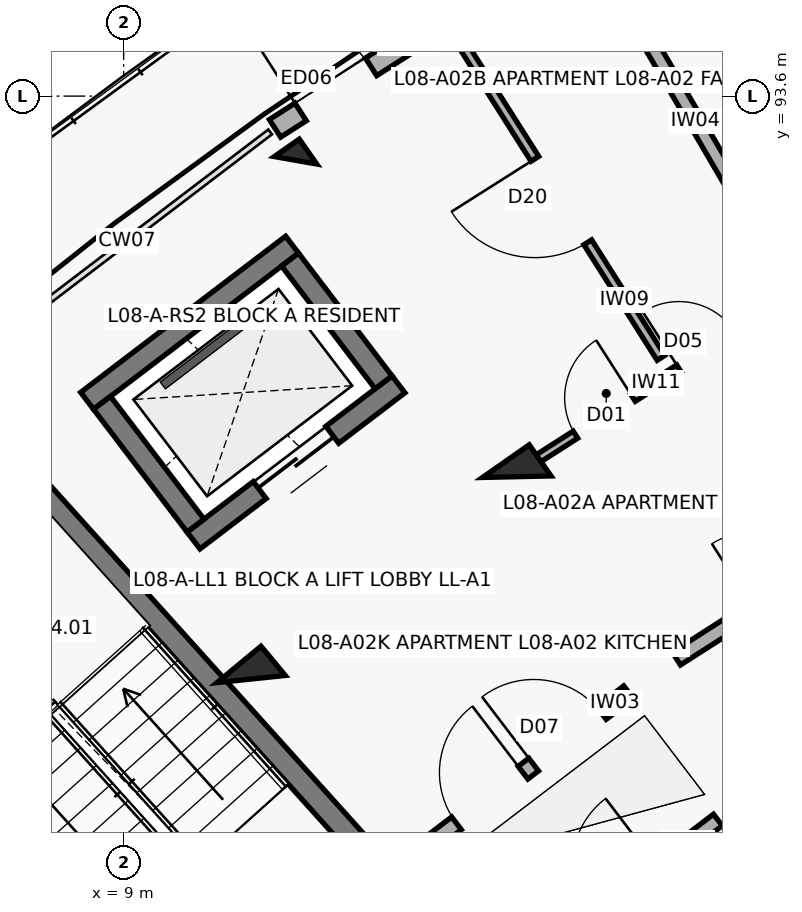
"""IFC4 building model, lengths in metres.
Left out: names, types, materials, properties, quantities, classifications, styles, units other than length and angle.
Written with IfcOpenShell. Run it as: python <this file> out.ifc"""

import sys

from ifc_helpers import new_model, si_unit, direction, frame, frame_2d, origin, origin_2d, place, context, subcontext, project, spatial, rectangle, extrude, element, fill, save


model = new_model("IFC4")
c1 = context("Model", 3, precision=1e-05, world=origin(), true_north=direction((0.0, 1.0)))
c2 = subcontext(c1, "Body", "Model", "MODEL_VIEW")
j1 = project(units=[si_unit("LENGTHUNIT", "METRE"), si_unit("PLANEANGLEUNIT", "RADIAN")], contexts=[c1])
p1 = place(None, origin())
s1 = spatial("IfcSite", under=j1, at=p1, CompositionType="ELEMENT")
p2 = place(p1, origin())
s2 = spatial("IfcBuilding", under=s1, at=p2, CompositionType="ELEMENT")
p3 = place(p2, frame((0.0, 0.0, 26.7)))
s3 = spatial("IfcBuildingStorey", under=s2, at=p3, CompositionType="ELEMENT", Elevation=26.7)
for number, where, z_axis, x_axis in (
    (1, (10.678, 85.93, 0.0), (0.0, 0.0, 1.0), (-0.638, 0.77, 0.0)),
    (2, (14.172, 88.592, 0.0), (0.0, 0.0, 1.0), (-0.573, 0.82, 0.0)),
):
    element("IfcColumn", number, at=place(p3, frame(where, z_axis=z_axis, x_axis=x_axis)), inside=s3, PredefinedType="COLUMN", context=c2, shape_type="SweptSolid", body=[
        extrude(rectangle(XDim=0.5, YDim=0.75, at=origin_2d()), origin(), (0.0, 0.0, 1.0), 3.1),
    ])
p4 = place(p3, frame((11.261, 92.755, 0.0), z_axis=(0.0, 0.0, 1.0), x_axis=(-0.573004420611, 0.819552276527, 0.0)))
e3 = element("IfcColumn", 3, at=p4, inside=s3, PredefinedType="COLUMN", context=c2, shape_type="SweptSolid", body=[
    extrude(rectangle(XDim=0.4, YDim=0.4, at=origin_2d()), origin(), (0.0, 0.0, 1.0), 3.1),
])
p5 = place(p3, frame((10.992, 93.176, 0.0), z_axis=(0.0, 0.0, 1.0), x_axis=(0.84226218024, 0.539068103061, 0.0)))
e4 = element("IfcWall", 4, at=p5, inside=s3, PredefinedType="SOLIDWALL", context=c2, shape_type="SweptSolid", body=[
    extrude(rectangle(XDim=4.809, YDim=0.275, at=frame_2d((2.404, 0.0))), origin(), (0.0, 0.0, 1.0), 2.25),
])
p6 = place(p5, frame((0.4, 0.0, 0.0)))
e5 = element("IfcOpeningElement", 5, at=p6, cuts=e4, PredefinedType="OPENING", context=c2, shape_type="SweptSolid", body=[
    extrude(rectangle(XDim=1.1, YDim=2.15, at=frame_2d((0.55, 1.075))), frame((0.0, 0.147, 0.0), z_axis=(0.0, -1.0, 0.0), x_axis=(1.0, 0.0, 0.0)), (0.0, 0.0, 1.0), 0.295),
])
p7 = place(p5, frame((2.659, 0.0, 0.35)))
e6 = element("IfcOpeningElement", 6, at=p7, cuts=e4, PredefinedType="OPENING", context=c2, shape_type="SweptSolid", body=[
    extrude(rectangle(XDim=1.8, YDim=1.65, at=frame_2d((0.9, 0.825))), frame((0.0, 0.147, 0.0), z_axis=(0.0, -1.0, 0.0), x_axis=(1.0, 0.0, 0.0)), (0.0, 0.0, 1.0), 0.295),
])
p8 = place(p3, frame((12.345, 83.461, 0.0), z_axis=(0.0, 0.0, 1.0), x_axis=(-0.668868253964, 0.743380964808, 0.0)))
e7 = element("IfcWall", 7, at=p8, inside=s3, PredefinedType="SHEAR", context=c2, shape_type="SweptSolid", body=[
    extrude(rectangle(XDim=7.69, YDim=0.3, at=frame_2d((3.845, 0.0))), origin(), (0.0, 0.0, 1.0), 3.1),
])
p9 = place(p3, frame((9.691, 81.073, 0.0), z_axis=(0.0, 0.0, 1.0), x_axis=(-0.668885797871, 0.743365179038, 0.0)))
e8 = element("IfcWall", 8, at=p9, inside=s3, PredefinedType="SHEAR", context=c2, shape_type="SweptSolid", body=[
    extrude(rectangle(XDim=7.69, YDim=0.3, at=frame_2d((3.845, 0.0))), origin(), (0.0, 0.0, 1.0), 3.1),
])
p10 = place(p3, frame((12.616, 89.807, 0.0), z_axis=(0.0, 0.0, 1.0), x_axis=(-0.795474703455, -0.605986795371, 0.0)))
e9 = element("IfcWall", 9, at=p10, inside=s3, PredefinedType="SHEAR", context=c2, shape_type="SweptSolid", body=[
    extrude(rectangle(XDim=3.39, YDim=0.28, at=frame_2d((1.695, 0.0))), origin(), (0.0, 0.0, 1.0), 3.1),
])
p11 = place(p10, frame((1.095, 0.0, 0.0)))
e10 = element("IfcOpeningElement", 10, at=p11, cuts=e9, PredefinedType="OPENING", context=c2, shape_type="SweptSolid", body=[
    extrude(rectangle(XDim=1.2, YDim=2.15, at=frame_2d((0.6, 1.075))), frame((0.0, 0.15, 0.0), z_axis=(0.0, -1.0, 0.0), x_axis=(1.0, 0.0, 0.0)), (0.0, 0.0, 1.0), 0.3),
])
p12 = place(p3, frame((11.216, 91.645, 0.0), z_axis=(0.0, 0.0, 1.0), x_axis=(-0.795439986025, -0.606032365994, 0.0)))
e11 = element("IfcWall", 11, at=p12, inside=s3, PredefinedType="SHEAR", context=c2, shape_type="SweptSolid", body=[
    extrude(rectangle(XDim=3.39, YDim=0.28, at=frame_2d((1.695, 0.0))), origin(), (0.0, 0.0, 1.0), 3.1),
])
p13 = place(p3, frame((12.42, 89.834, 0.0), z_axis=(0.0, 0.0, 1.0), x_axis=(-0.605948992168, 0.795503500238, 0.0)))
e12 = element("IfcWall", 12, at=p13, inside=s3, PredefinedType="SHEAR", context=c2, shape_type="SweptSolid", body=[
    extrude(rectangle(XDim=2.03, YDim=0.28, at=frame_2d((1.015, 0.0))), origin(), (0.0, 0.0, 1.0), 3.1),
])
p14 = place(p3, frame((9.946, 87.949, 0.0), z_axis=(0.0, 0.0, 1.0), x_axis=(-0.605891019062, 0.795547656033, 0.0)))
e13 = element("IfcWall", 13, at=p14, inside=s3, PredefinedType="SHEAR", context=c2, shape_type="SweptSolid", body=[
    extrude(rectangle(XDim=2.03, YDim=0.28, at=frame_2d((1.015, 0.0))), origin(), (0.0, 0.0, 1.0), 3.1),
])
p15 = place(p3, frame((13.021, 83.759, 0.0), z_axis=(0.0, 0.0, 1.0), x_axis=(0.795498026433, 0.605956178235, 0.0)))
e14 = element("IfcWall", 14, at=p15, inside=s3, PredefinedType="SOLIDWALL", context=c2, shape_type="SweptSolid", body=[
    extrude(rectangle(XDim=3.296, YDim=0.21, at=frame_2d((1.648, 0.0))), origin(), (0.0, 0.0, 1.0), 2.08),
])
p16 = place(p15, frame((0.45, 0.0, 0.0)))
e15 = element("IfcOpeningElement", 15, at=p16, cuts=e14, PredefinedType="OPENING", context=c2, shape_type="SweptSolid", body=[
    extrude(rectangle(XDim=1.1, YDim=2.15, at=frame_2d((0.55, 1.075))), frame((0.0, 0.115, 0.0), z_axis=(0.0, -1.0, 0.0), x_axis=(1.0, 0.0, 0.0)), (0.0, 0.0, 1.0), 0.23),
])
p17 = place(p15, frame((1.726, 0.0, 0.0)))
e16 = element("IfcOpeningElement", 16, at=p17, cuts=e14, PredefinedType="OPENING", context=c2, shape_type="SweptSolid", body=[
    extrude(rectangle(XDim=1.12, YDim=2.15, at=frame_2d((0.56, 1.075))), frame((0.0, 0.115, 0.0), z_axis=(0.0, -1.0, 0.0), x_axis=(1.0, 0.0, 0.0)), (0.0, 0.0, 1.0), 0.23),
])
p18 = place(p3, frame((14.329, 82.18, 0.0), z_axis=(0.0, 0.0, 1.0), x_axis=(0.795501577908, 0.605951515838, 0.0)))
e17 = element("IfcWall", 17, at=p18, inside=s3, PredefinedType="SOLIDWALL", context=c2, shape_type="SweptSolid", body=[
    extrude(rectangle(XDim=3.129, YDim=0.19, at=frame_2d((1.564, 0.0))), origin(), (0.0, 0.0, 1.0), 2.08),
])
p19 = place(p18, frame((1.004, 0.0, 0.0)))
e18 = element("IfcOpeningElement", 18, at=p19, cuts=e17, PredefinedType="OPENING", context=c2, shape_type="SweptSolid", body=[
    extrude(rectangle(XDim=1.12, YDim=2.15, at=frame_2d((0.56, 1.075))), frame((0.0, 0.105, 0.0), z_axis=(0.0, -1.0, 0.0), x_axis=(1.0, 0.0, 0.0)), (0.0, 0.0, 1.0), 0.21),
])
p20 = place(p3, frame((16.272, 86.199, 0.0), z_axis=(0.0, 0.0, 1.0), x_axis=(0.842257205985, 0.539075874963, 0.0)))
e19 = element("IfcWall", 19, at=p20, inside=s3, PredefinedType="SOLIDWALL", context=c2, shape_type="SweptSolid", body=[
    extrude(rectangle(XDim=3.436, YDim=0.2, at=frame_2d((1.718, 0.0))), origin(), (0.0, 0.0, 1.0), 2.08),
])
p21 = place(p20, frame((1.208, 0.0, 0.0)))
e20 = element("IfcOpeningElement", 20, at=p21, cuts=e19, PredefinedType="OPENING", context=c2, shape_type="SweptSolid", body=[
    extrude(rectangle(XDim=1.02, YDim=2.15, at=frame_2d((0.51, 1.075))), frame((0.0, 0.11, 0.0), z_axis=(0.0, -1.0, 0.0), x_axis=(1.0, 0.0, 0.0)), (0.0, 0.0, 1.0), 0.22),
])
p22 = place(p3, frame((14.396, 88.795, 0.0), z_axis=(0.0, 0.0, 1.0), x_axis=(0.842271400662, 0.539053696423, 0.0)))
e21 = element("IfcWall", 21, at=p22, inside=s3, PredefinedType="PARTITIONING", context=c2, shape_type="SweptSolid", body=[
    extrude(rectangle(XDim=3.797, YDim=0.11, at=frame_2d((1.898, 0.0))), origin(), (0.0, 0.0, 1.0), 2.08),
])
p23 = place(p22, frame((0.65, 0.0, 0.0)))
e22 = element("IfcOpeningElement", 22, at=p23, cuts=e21, PredefinedType="OPENING", context=c2, shape_type="SweptSolid", body=[
    extrude(rectangle(XDim=0.9, YDim=2.1, at=frame_2d((0.45, 1.05))), frame((0.0, 0.065, 0.0), z_axis=(0.0, -1.0, 0.0), x_axis=(1.0, 0.0, 0.0)), (0.0, 0.0, 1.0), 0.13),
])
p24 = place(p22, frame((2.267, 0.0, 0.0)))
e23 = element("IfcOpeningElement", 23, at=p24, cuts=e21, PredefinedType="OPENING", context=c2, shape_type="SweptSolid", body=[
    extrude(rectangle(XDim=0.88, YDim=2.1, at=frame_2d((0.44, 1.05))), frame((0.0, 0.065, 0.0), z_axis=(0.0, -1.0, 0.0), x_axis=(1.0, 0.0, 0.0)), (0.0, 0.0, 1.0), 0.13),
])
p25 = place(p3, frame((16.07, 90.156, 0.0), z_axis=(0.0, 0.0, 1.0), x_axis=(-0.535268985628, 0.84468166372, 0.0)))
e24 = element("IfcWall", 24, at=p25, inside=s3, PredefinedType="PARTITIONING", context=c2, shape_type="SweptSolid", body=[
    extrude(rectangle(XDim=4.9, YDim=0.12, at=frame_2d((2.45, 0.0))), origin(), (0.0, 0.0, 1.0), 2.08),
])
p26 = place(p25, frame((1.8, 0.0, 0.0)))
e25 = element("IfcOpeningElement", 25, at=p26, cuts=e24, PredefinedType="OPENING", context=c2, shape_type="SweptSolid", body=[
    extrude(rectangle(XDim=1.3, YDim=2.1, at=frame_2d((0.65, 1.05))), frame((0.0, 0.07, 0.0), z_axis=(0.0, -1.0, 0.0), x_axis=(1.0, 0.0, 0.0)), (0.0, 0.0, 1.0), 0.14),
])
p27 = place(p3, frame((17.621, 91.392, 0.0), z_axis=(0.0, 0.0, 1.0), x_axis=(-0.504216452091, 0.863577309475, 0.0)))
e26 = element("IfcWall", 26, at=p27, inside=s3, PredefinedType="SOLIDWALL", context=c2, shape_type="SweptSolid", body=[
    extrude(rectangle(XDim=4.35, YDim=0.185, at=frame_2d((2.175, 0.0))), origin(), (0.0, 0.0, 1.0), 2.08),
])
p28 = place(p6, origin())
e27 = element("IfcDoor", 27, at=p28, inside=s3, OperationType="SINGLE_SWING_LEFT", PredefinedType="DOOR", context=c2, shape_type="SweptSolid", body=[
    extrude(rectangle(XDim=1.1, YDim=2.15, at=frame_2d((0.55, 1.075))), frame((0.0, 0.025, 0.0), z_axis=(0.0, -1.0, 0.0), x_axis=(1.0, 0.0, 0.0)), (0.0, 0.0, 1.0), 0.05),
])
fill(e5, e27)
p29 = place(p11, origin())
e28 = element("IfcDoor", 28, at=p29, inside=s3, OperationType="DOUBLE_DOOR_SLIDING", PredefinedType="DOOR", context=c2, shape_type="SweptSolid", body=[
    extrude(rectangle(XDim=1.2, YDim=2.15, at=frame_2d((0.6, 1.075))), frame((0.0, 0.025, 0.0), z_axis=(0.0, -1.0, 0.0), x_axis=(1.0, 0.0, 0.0)), (0.0, 0.0, 1.0), 0.05),
])
fill(e10, e28)
p30 = place(p16, origin())
e29 = element("IfcDoor", 29, at=p30, inside=s3, OperationType="SINGLE_SWING_RIGHT", PredefinedType="DOOR", context=c2, shape_type="SweptSolid", body=[
    extrude(rectangle(XDim=1.1, YDim=2.15, at=frame_2d((0.55, 1.075))), frame((0.0, 0.025, 0.0), z_axis=(0.0, -1.0, 0.0), x_axis=(1.0, 0.0, 0.0)), (0.0, 0.0, 1.0), 0.05),
])
fill(e15, e29)
p31 = place(p17, origin())
e30 = element("IfcDoor", 30, at=p31, inside=s3, OperationType="SINGLE_SWING_LEFT", PredefinedType="DOOR", context=c2, shape_type="SweptSolid", body=[
    extrude(rectangle(XDim=1.12, YDim=2.15, at=frame_2d((0.56, 1.075))), frame((0.0, 0.025, 0.0), z_axis=(0.0, -1.0, 0.0), x_axis=(1.0, 0.0, 0.0)), (0.0, 0.0, 1.0), 0.05),
])
fill(e16, e30)
p32 = place(p23, origin())
e31 = element("IfcDoor", 31, at=p32, inside=s3, OperationType="SINGLE_SWING_RIGHT", PredefinedType="DOOR", context=c2, shape_type="SweptSolid", body=[
    extrude(rectangle(XDim=0.9, YDim=2.1, at=frame_2d((0.45, 1.05))), frame((0.0, 0.025, 0.0), z_axis=(0.0, -1.0, 0.0), x_axis=(1.0, 0.0, 0.0)), (0.0, 0.0, 1.0), 0.05),
])
fill(e22, e31)
p33 = place(p24, origin())
e32 = element("IfcDoor", 32, at=p33, inside=s3, OperationType="SINGLE_SWING_LEFT", PredefinedType="DOOR", context=c2, shape_type="SweptSolid", body=[
    extrude(rectangle(XDim=0.88, YDim=2.1, at=frame_2d((0.44, 1.05))), frame((0.0, 0.025, 0.0), z_axis=(0.0, -1.0, 0.0), x_axis=(1.0, 0.0, 0.0)), (0.0, 0.0, 1.0), 0.05),
])
fill(e23, e32)
p34 = place(p26, origin())
e33 = element("IfcDoor", 33, at=p34, inside=s3, OperationType="SINGLE_SWING_RIGHT", PredefinedType="DOOR", context=c2, shape_type="SweptSolid", body=[
    extrude(rectangle(XDim=1.3, YDim=2.1, at=frame_2d((0.65, 1.05))), frame((0.0, 0.025, 0.0), z_axis=(0.0, -1.0, 0.0), x_axis=(1.0, 0.0, 0.0)), (0.0, 0.0, 1.0), 0.05),
])
fill(e25, e33)
save(model, sys.argv[1])
